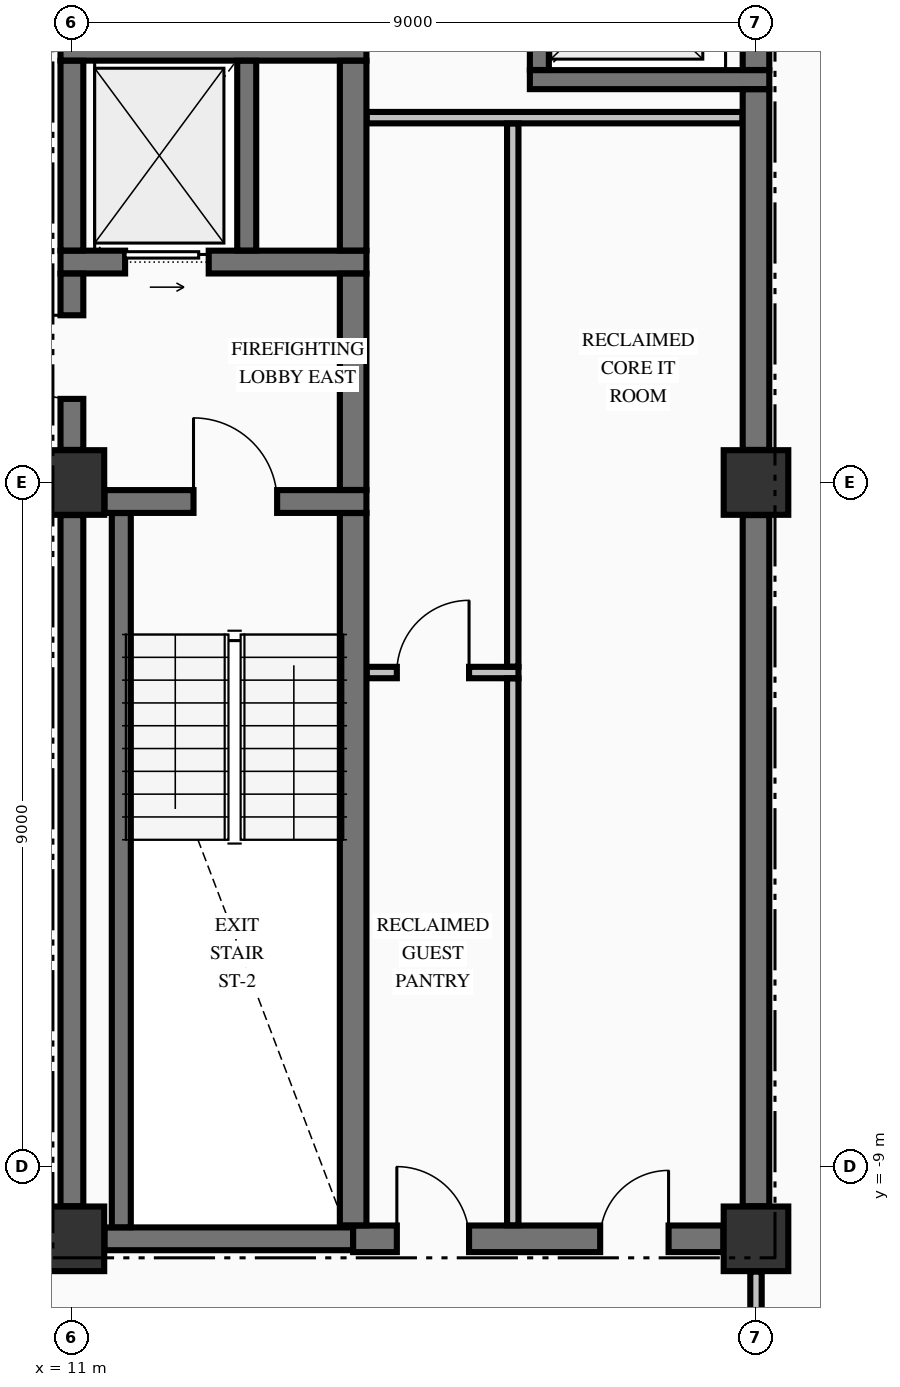
"""IFC4 building model, lengths in metres.
Left out: names, types, materials, properties, quantities, classifications, styles, units other than length and angle.
Written with IfcOpenShell. Run it as: python <this file> out.ifc"""

import sys

from ifc_helpers import new_model, si_unit, direction, frame, frame_2d, origin, origin_2d, place, context, subcontext, project, spatial, rectangle, extrude, element, fill, save


model = new_model("IFC4")
c1 = context("Model", 3, precision=1e-05, world=origin(), true_north=direction((0.0, 1.0)))
c2 = subcontext(c1, "Body", "Model", "MODEL_VIEW")
j1 = project(units=[si_unit("LENGTHUNIT", "METRE"), si_unit("PLANEANGLEUNIT", "RADIAN")], contexts=[c1])
p1 = place(None, origin())
s1 = spatial("IfcSite", under=j1, at=p1, CompositionType="ELEMENT")
p2 = place(p1, origin())
s2 = spatial("IfcBuilding", under=s1, at=p2, CompositionType="ELEMENT")
p3 = place(p2, frame((0.0, 0.0, 191.46)))
s3 = spatial("IfcBuildingStorey", under=s2, at=p3, CompositionType="ELEMENT", Elevation=191.46)
for number, where, z_axis, x_axis in (
    (1, (11.0, -9.95, -0.425), (0.0, 0.0, 1.0), (1.0, 0.0, 0.0)),
    (2, (11.0, 0.0, -0.425), (0.0, 0.0, 1.0), (1.0, 0.0, 0.0)),
    (3, (20.0, -9.95, -0.425), (0.0, 0.0, 1.0), (1.0, 0.0, 0.0)),
    (4, (20.0, 0.0, -0.425), (0.0, 0.0, 1.0), (1.0, 0.0, 0.0)),
):
    element("IfcColumn", number, at=place(p3, frame(where, z_axis=z_axis, x_axis=x_axis)), inside=s3, PredefinedType="COLUMN", context=c2, shape_type="SweptSolid", body=[
        extrude(rectangle(XDim=0.85, YDim=0.85, at=origin_2d()), origin(), (0.0, 0.0, 1.0), 3.55),
    ])
p4 = place(p3, frame((11.429, -9.95, 0.0), z_axis=(0.0, 0.0, 1.0), x_axis=(1.0, 0.0, 0.0)))
e5 = element("IfcWall", 5, at=p4, inside=s3, PredefinedType="SHEAR", context=c2, shape_type="SweptSolid", body=[
    extrude(rectangle(XDim=3.271, YDim=0.3, at=frame_2d((1.635, 0.0))), origin(), (0.0, 0.0, 1.0), 3.125),
])
p5 = place(p3, frame((14.7, -9.95, 0.0), z_axis=(0.0, 0.0, 1.0), x_axis=(1.0, 0.0, 0.0)))
e6 = element("IfcWall", 6, at=p5, inside=s3, PredefinedType="SHEAR", context=c2, shape_type="SweptSolid", body=[
    extrude(rectangle(XDim=4.871, YDim=0.35, at=frame_2d((2.436, 0.0))), origin(), (0.0, 0.0, 1.0), 3.125),
])
p6 = place(p5, frame((3.25, 0.0, 0.0)))
e7 = element("IfcOpeningElement", 7, at=p6, cuts=e6, PredefinedType="OPENING", context=c2, shape_type="SweptSolid", body=[
    extrude(rectangle(XDim=0.9, YDim=2.15, at=frame_2d((0.45, 1.075))), frame((0.0, 0.185, 0.0), z_axis=(0.0, -1.0, 0.0), x_axis=(1.0, 0.0, 0.0)), (0.0, 0.0, 1.0), 0.37),
])
p7 = place(p5, frame((0.575, 0.0, 0.0)))
e8 = element("IfcOpeningElement", 8, at=p7, cuts=e6, PredefinedType="OPENING", context=c2, shape_type="SweptSolid", body=[
    extrude(rectangle(XDim=0.95, YDim=2.15, at=frame_2d((0.475, 1.075))), frame((0.0, 0.185, 0.0), z_axis=(0.0, -1.0, 0.0), x_axis=(1.0, 0.0, 0.0)), (0.0, 0.0, 1.0), 0.37),
])
p8 = place(p3, frame((11.429, -0.25, 0.0), z_axis=(0.0, 0.0, 1.0), x_axis=(1.0, 0.0, 0.0)))
e9 = element("IfcWall", 9, at=p8, inside=s3, PredefinedType="SHEAR", context=c2, shape_type="SweptSolid", body=[
    extrude(rectangle(XDim=3.446, YDim=0.3, at=frame_2d((1.723, 0.0))), origin(), (0.0, 0.0, 1.0), 3.125),
])
p9 = place(p8, frame((1.171, 0.0, 0.0)))
e10 = element("IfcOpeningElement", 10, at=p9, cuts=e9, PredefinedType="OPENING", context=c2, shape_type="SweptSolid", body=[
    extrude(rectangle(XDim=1.1, YDim=2.15, at=frame_2d((0.55, 1.075))), frame((0.0, 0.16, 0.0), z_axis=(0.0, -1.0, 0.0), x_axis=(1.0, 0.0, 0.0)), (0.0, 0.0, 1.0), 0.32),
])
p10 = place(p3, frame((10.85, 2.9, 0.0), z_axis=(0.0, 0.0, 1.0), x_axis=(1.0, 0.0, 0.0)))
e11 = element("IfcWall", 11, at=p10, inside=s3, PredefinedType="SHEAR", context=c2, shape_type="SweptSolid", body=[
    extrude(rectangle(XDim=4.025, YDim=0.3, at=frame_2d((2.012, 0.0))), origin(), (0.0, 0.0, 1.0), 3.125),
])
p11 = place(p10, frame((0.85, 0.0, 0.0)))
e12 = element("IfcOpeningElement", 12, at=p11, cuts=e11, PredefinedType="OPENING", context=c2, shape_type="SweptSolid", body=[
    extrude(rectangle(XDim=1.1, YDim=2.2, at=frame_2d((0.55, 1.1))), frame((0.0, 0.16, 0.0), z_axis=(0.0, -1.0, 0.0), x_axis=(1.0, 0.0, 0.0)), (0.0, 0.0, 1.0), 0.32),
])
p12 = place(p3, frame((17.025, 5.3, 0.0), z_axis=(0.0, 0.0, 1.0), x_axis=(1.0, 0.0, 0.0)))
e13 = element("IfcWall", 13, at=p12, inside=s3, PredefinedType="SOLIDWALL", context=c2, shape_type="SweptSolid", body=[
    extrude(rectangle(XDim=3.15, YDim=0.25, at=frame_2d((1.575, 0.0))), origin(), (0.0, 0.0, 1.0), 3.125),
])
p13 = place(p3, frame((10.85, 5.7, 0.0), z_axis=(0.0, 0.0, 1.0), x_axis=(1.0, 0.0, 0.0)))
e14 = element("IfcWall", 14, at=p13, inside=s3, PredefinedType="SHEAR", context=c2, shape_type="SweptSolid", body=[
    extrude(rectangle(XDim=4.025, YDim=0.3, at=frame_2d((2.012, 0.0))), origin(), (0.0, 0.0, 1.0), 3.125),
])
p14 = place(p3, frame((14.878, -2.5, 0.0), z_axis=(0.0, 0.0, 1.0), x_axis=(1.0, 0.0, 0.0)))
e15 = element("IfcWall", 15, at=p14, inside=s3, PredefinedType="PARTITIONING", context=c2, shape_type="SweptSolid", body=[
    extrude(rectangle(XDim=1.997, YDim=0.15, at=frame_2d((0.999, 0.0))), origin(), (0.0, 0.0, 1.0), 3.125),
])
p15 = place(p14, frame((0.397, 0.0, 0.0)))
e16 = element("IfcOpeningElement", 16, at=p15, cuts=e15, PredefinedType="OPENING", context=c2, shape_type="SweptSolid", body=[
    extrude(rectangle(XDim=0.95, YDim=2.15, at=frame_2d((0.475, 1.075))), frame((0.0, 0.085, 0.0), z_axis=(0.0, -1.0, 0.0), x_axis=(1.0, 0.0, 0.0)), (0.0, 0.0, 1.0), 0.17),
])
p16 = place(p3, frame((14.878, 4.8, 0.0), z_axis=(0.0, 0.0, 1.0), x_axis=(1.0, 0.0, 0.0)))
e17 = element("IfcWall", 17, at=p16, inside=s3, PredefinedType="PARTITIONING", context=c2, shape_type="SweptSolid", body=[
    extrude(rectangle(XDim=4.944, YDim=0.15, at=frame_2d((2.472, 0.0))), origin(), (0.0, 0.0, 1.0), 3.125),
])
p17 = place(p3, frame((11.0, -9.521, 0.0), z_axis=(0.0, 0.0, 1.0), x_axis=(0.0, 1.0, 0.0)))
e18 = element("IfcWall", 18, at=p17, inside=s3, PredefinedType="SHEAR", context=c2, shape_type="SweptSolid", body=[
    extrude(rectangle(XDim=9.092, YDim=0.3, at=frame_2d((4.546, 0.0))), origin(), (0.0, 0.0, 1.0), 3.125),
])
p18 = place(p3, frame((11.0, 0.429, 0.0), z_axis=(0.0, 0.0, 1.0), x_axis=(0.0, 1.0, 0.0)))
e19 = element("IfcWall", 19, at=p18, inside=s3, PredefinedType="SHEAR", context=c2, shape_type="SweptSolid", body=[
    extrude(rectangle(XDim=2.319, YDim=0.3, at=frame_2d((1.16, 0.0))), origin(), (0.0, 0.0, 1.0), 3.125),
])
p19 = place(p18, frame((0.671, 0.0, 0.0)))
e20 = element("IfcOpeningElement", 20, at=p19, cuts=e19, PredefinedType="OPENING", context=c2, shape_type="SweptSolid", body=[
    extrude(rectangle(XDim=1.1, YDim=2.15, at=frame_2d((0.55, 1.075))), frame((0.0, 0.16, 0.0), z_axis=(0.0, -1.0, 0.0), x_axis=(1.0, 0.0, 0.0)), (0.0, 0.0, 1.0), 0.32),
])
p20 = place(p3, frame((11.0, 3.052, 0.0), z_axis=(0.0, 0.0, 1.0), x_axis=(0.0, 1.0, 0.0)))
e21 = element("IfcWall", 21, at=p20, inside=s3, PredefinedType="SHEAR", context=c2, shape_type="SweptSolid", body=[
    extrude(rectangle(XDim=2.496, YDim=0.3, at=frame_2d((1.248, 0.0))), origin(), (0.0, 0.0, 1.0), 3.125),
])
p21 = place(p3, frame((11.65, -9.798, 0.0), z_axis=(0.0, 0.0, 1.0), x_axis=(0.0, 1.0, 0.0)))
e22 = element("IfcWall", 22, at=p21, inside=s3, PredefinedType="SOLIDWALL", context=c2, shape_type="SweptSolid", body=[
    extrude(rectangle(XDim=9.396, YDim=0.25, at=frame_2d((4.698, 0.0))), origin(), (0.0, 0.0, 1.0), 3.125),
])
p22 = place(p3, frame((13.3, 3.052, 0.0), z_axis=(0.0, 0.0, 1.0), x_axis=(0.0, 1.0, 0.0)))
e23 = element("IfcWall", 23, at=p22, inside=s3, PredefinedType="SOLIDWALL", context=c2, shape_type="SweptSolid", body=[
    extrude(rectangle(XDim=2.496, YDim=0.25, at=frame_2d((1.248, 0.0))), origin(), (0.0, 0.0, 1.0), 3.125),
])
p23 = place(p3, frame((14.7, -9.773, 0.0), z_axis=(0.0, 0.0, 1.0), x_axis=(0.0, 1.0, 0.0)))
e24 = element("IfcWall", 24, at=p23, inside=s3, PredefinedType="SHEAR", context=c2, shape_type="SweptSolid", body=[
    extrude(rectangle(XDim=9.371, YDim=0.35, at=frame_2d((4.686, 0.0))), origin(), (0.0, 0.0, 1.0), 3.125),
])
p24 = place(p3, frame((14.7, -0.098, 0.0), z_axis=(0.0, 0.0, 1.0), x_axis=(0.0, 1.0, 0.0)))
e25 = element("IfcWall", 25, at=p24, inside=s3, PredefinedType="SHEAR", context=c2, shape_type="SweptSolid", body=[
    extrude(rectangle(XDim=2.846, YDim=0.35, at=frame_2d((1.423, 0.0))), origin(), (0.0, 0.0, 1.0), 3.125),
])
p25 = place(p3, frame((14.7, 3.052, 0.0), z_axis=(0.0, 0.0, 1.0), x_axis=(0.0, 1.0, 0.0)))
e26 = element("IfcWall", 26, at=p25, inside=s3, PredefinedType="SHEAR", context=c2, shape_type="SweptSolid", body=[
    extrude(rectangle(XDim=2.496, YDim=0.35, at=frame_2d((1.248, 0.0))), origin(), (0.0, 0.0, 1.0), 3.125),
])
p26 = place(p3, frame((17.15, 5.427, 0.0), z_axis=(0.0, 0.0, 1.0), x_axis=(0.0, 1.0, 0.0)))
e27 = element("IfcWall", 27, at=p26, inside=s3, PredefinedType="SOLIDWALL", context=c2, shape_type="SweptSolid", body=[
    extrude(rectangle(XDim=2.196, YDim=0.25, at=frame_2d((1.098, 0.0))), origin(), (0.0, 0.0, 1.0), 3.125),
])
p27 = place(p26, frame((0.548, 0.0, 0.0)))
e28 = element("IfcOpeningElement", 28, at=p27, cuts=e27, PredefinedType="OPENING", context=c2, shape_type="SweptSolid", body=[
    extrude(rectangle(XDim=1.1, YDim=2.2, at=frame_2d((0.55, 1.1))), frame((0.0, 0.135, 0.0), z_axis=(0.0, -1.0, 0.0), x_axis=(1.0, 0.0, 0.0)), (0.0, 0.0, 1.0), 0.27),
])
p28 = place(p3, frame((20.0, -9.521, 0.0), z_axis=(0.0, 0.0, 1.0), x_axis=(0.0, 1.0, 0.0)))
e29 = element("IfcWall", 29, at=p28, inside=s3, PredefinedType="SHEAR", context=c2, shape_type="SweptSolid", body=[
    extrude(rectangle(XDim=9.092, YDim=0.35, at=frame_2d((4.546, 0.0))), origin(), (0.0, 0.0, 1.0), 3.125),
])
p29 = place(p3, frame((20.0, 0.429, 0.0), z_axis=(0.0, 0.0, 1.0), x_axis=(0.0, 1.0, 0.0)))
e30 = element("IfcWall", 30, at=p29, inside=s3, PredefinedType="SHEAR", context=c2, shape_type="SweptSolid", body=[
    extrude(rectangle(XDim=4.744, YDim=0.35, at=frame_2d((2.372, 0.0))), origin(), (0.0, 0.0, 1.0), 3.125),
])
p30 = place(p3, frame((20.0, 5.427, 0.0), z_axis=(0.0, 0.0, 1.0), x_axis=(0.0, 1.0, 0.0)))
e31 = element("IfcWall", 31, at=p30, inside=s3, PredefinedType="SHEAR", context=c2, shape_type="SweptSolid", body=[
    extrude(rectangle(XDim=2.196, YDim=0.35, at=frame_2d((1.098, 0.0))), origin(), (0.0, 0.0, 1.0), 3.125),
])
p31 = place(p3, frame((16.8, -9.772, 0.0), z_axis=(0.0, 0.0, 1.0), x_axis=(0.0, 1.0, 0.0)))
e32 = element("IfcWall", 32, at=p31, inside=s3, PredefinedType="PARTITIONING", context=c2, shape_type="SweptSolid", body=[
    extrude(rectangle(XDim=7.194, YDim=0.15, at=frame_2d((3.597, 0.0))), origin(), (0.0, 0.0, 1.0), 3.125),
])
p32 = place(p3, frame((16.8, -2.422, 0.0), z_axis=(0.0, 0.0, 1.0), x_axis=(0.0, 1.0, 0.0)))
e33 = element("IfcWall", 33, at=p32, inside=s3, PredefinedType="PARTITIONING", context=c2, shape_type="SweptSolid", body=[
    extrude(rectangle(XDim=7.144, YDim=0.15, at=frame_2d((3.572, 0.0))), origin(), (0.0, 0.0, 1.0), 3.125),
])
p33 = place(p3, frame((20.0, -12.472, 0.0), z_axis=(0.0, 0.0, 1.0), x_axis=(0.0, 1.0, 0.0)))
e34 = element("IfcWall", 34, at=p33, inside=s3, PredefinedType="PARTITIONING", context=c2, shape_type="SweptSolid", body=[
    extrude(rectangle(XDim=2.091, YDim=0.15, at=frame_2d((1.045, 0.0))), origin(), (0.0, 0.0, 1.0), 2.317),
])
p34 = place(p9, origin())
e35 = element("IfcDoor", 35, at=p34, inside=s3, OperationType="SINGLE_SWING_LEFT", PredefinedType="DOOR", context=c2, shape_type="SweptSolid", body=[
    extrude(rectangle(XDim=1.1, YDim=2.15, at=frame_2d((0.55, 1.075))), frame((0.0, 0.025, 0.0), z_axis=(0.0, -1.0, 0.0), x_axis=(1.0, 0.0, 0.0)), (0.0, 0.0, 1.0), 0.05),
])
fill(e10, e35)
p35 = place(p19, origin())
e36 = element("IfcDoor", 36, at=p35, inside=s3, OperationType="SINGLE_SWING_RIGHT", PredefinedType="DOOR", context=c2, shape_type="SweptSolid", body=[
    extrude(rectangle(XDim=1.1, YDim=2.15, at=frame_2d((0.55, 1.075))), frame((0.0, 0.025, 0.0), z_axis=(0.0, -1.0, 0.0), x_axis=(1.0, 0.0, 0.0)), (0.0, 0.0, 1.0), 0.05),
])
fill(e20, e36)
p36 = place(p11, origin())
e37 = element("IfcDoor", 37, at=p36, inside=s3, OperationType="SLIDING_TO_RIGHT", PredefinedType="DOOR", context=c2, shape_type="SweptSolid", body=[
    extrude(rectangle(XDim=1.1, YDim=2.2, at=frame_2d((0.55, 1.1))), frame((0.0, 0.025, 0.0), z_axis=(0.0, -1.0, 0.0), x_axis=(1.0, 0.0, 0.0)), (0.0, 0.0, 1.0), 0.05),
])
fill(e12, e37)
p37 = place(p6, origin())
e38 = element("IfcDoor", 38, at=p37, inside=s3, OperationType="SINGLE_SWING_RIGHT", PredefinedType="DOOR", context=c2, shape_type="SweptSolid", body=[
    extrude(rectangle(XDim=0.9, YDim=2.15, at=frame_2d((0.45, 1.075))), frame((0.0, 0.025, 0.0), z_axis=(0.0, -1.0, 0.0), x_axis=(1.0, 0.0, 0.0)), (0.0, 0.0, 1.0), 0.05),
])
fill(e7, e38)
p38 = place(p7, origin())
e39 = element("IfcDoor", 39, at=p38, inside=s3, OperationType="SINGLE_SWING_LEFT", PredefinedType="DOOR", context=c2, shape_type="SweptSolid", body=[
    extrude(rectangle(XDim=0.95, YDim=2.15, at=frame_2d((0.475, 1.075))), frame((0.0, 0.025, 0.0), z_axis=(0.0, -1.0, 0.0), x_axis=(1.0, 0.0, 0.0)), (0.0, 0.0, 1.0), 0.05),
])
fill(e8, e39)
p39 = place(p15, origin())
e40 = element("IfcDoor", 40, at=p39, inside=s3, OperationType="SINGLE_SWING_RIGHT", PredefinedType="DOOR", context=c2, shape_type="SweptSolid", body=[
    extrude(rectangle(XDim=0.95, YDim=2.15, at=frame_2d((0.475, 1.075))), frame((0.0, 0.025, 0.0), z_axis=(0.0, -1.0, 0.0), x_axis=(1.0, 0.0, 0.0)), (0.0, 0.0, 1.0), 0.05),
])
fill(e16, e40)
save(model, sys.argv[1])
